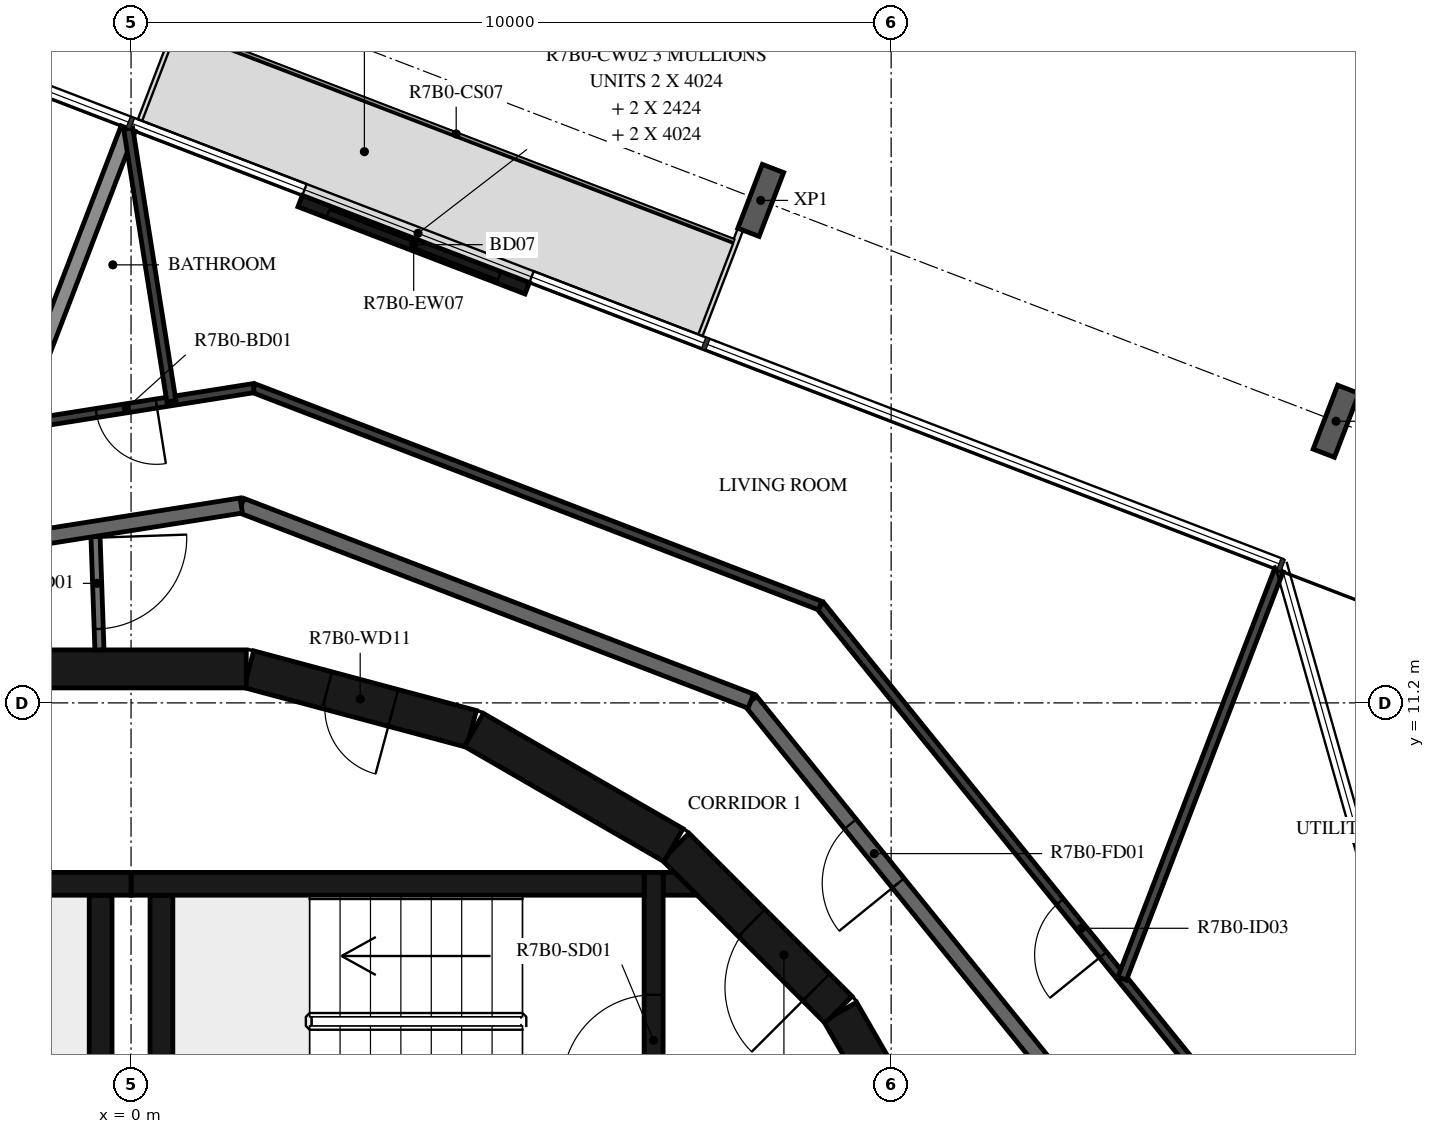
"""IFC4 building model, lengths in metres.
Left out: names, types, materials, properties, quantities, classifications, styles, units other than length and angle.
Written with IfcOpenShell. Run it as: python <this file> out.ifc"""

import sys

from ifc_helpers import new_model, si_unit, direction, frame, frame_2d, origin, origin_2d, place, context, subcontext, project, spatial, polyline, rectangle, i_section, outline, extrude, element, fill, save


model = new_model("IFC4")
c1 = context("Model", 3, precision=1e-05, world=origin(), true_north=direction((0.0, 1.0)))
c2 = subcontext(c1, "Body", "Model", "MODEL_VIEW")
j1 = project(units=[si_unit("LENGTHUNIT", "METRE"), si_unit("PLANEANGLEUNIT", "RADIAN")], contexts=[c1])
p1 = place(None, origin())
s1 = spatial("IfcSite", under=j1, at=p1, CompositionType="ELEMENT")
p2 = place(p1, origin())
s2 = spatial("IfcBuilding", under=s1, at=p2, CompositionType="ELEMENT")
p3 = place(p2, frame((0.0, 0.0, 277.4)))
s3 = spatial("IfcBuildingStorey", under=s2, at=p3, CompositionType="ELEMENT", Elevation=277.4)
for number, where, z_axis, x_axis in (
    (1, (15.854, 14.905, -0.38), (0.0, 0.0, 1.0), (0.934, -0.358, 0.0)),
    (2, (8.284, 17.811, -0.38), (0.0, 0.0, 1.0), (0.934, -0.358, 0.0)),
):
    element("IfcColumn", number, at=place(p3, frame(where, z_axis=z_axis, x_axis=x_axis)), inside=s3, PredefinedType="COLUMN", context=c2, shape_type="SweptSolid", body=[
        extrude(i_section(OverallWidth=0.3, OverallDepth=0.9, WebThickness=0.019, FlangeThickness=0.035, FilletRadius=0.03, at=origin_2d()), origin(), (0.0, 0.0, 1.0), 3.5),
    ])
p4 = place(p3, frame((5.212, 16.655, 0.0), z_axis=(0.0, 0.0, 1.0), x_axis=(-0.933579413923, 0.358370587381, 0.0)))
e3 = element("IfcWall", 3, at=p4, inside=s3, PredefinedType="STANDARD", context=c2, shape_type="SweptSolid", body=[
    extrude(rectangle(XDim=3.2, YDim=0.16, at=frame_2d((1.6, 0.0))), origin(), (0.0, 0.0, 1.0), 3.12),
])
p5 = place(p4, frame((0.4, 0.0, 0.0)))
e4 = element("IfcOpeningElement", 4, at=p5, cuts=e3, PredefinedType="OPENING", context=c2, shape_type="SweptSolid", body=[
    extrude(rectangle(XDim=2.4, YDim=2.4, at=frame_2d((1.2, 1.2))), frame((0.0, 0.09, 0.0), z_axis=(0.0, -1.0, 0.0), x_axis=(1.0, 0.0, 0.0)), (0.0, 0.0, 1.0), 0.18),
])
p6 = place(p3, frame((10.845, 4.51, 0.0), z_axis=(0.0, 0.0, 1.0), x_axis=(-0.500087131594, 0.865975092491, 0.0)))
e5 = element("IfcWall", 5, at=p6, inside=s3, PredefinedType="SHEAR", context=c2, shape_type="SweptSolid", body=[
    extrude(rectangle(XDim=3.033, YDim=0.5, at=frame_2d((1.516, 0.0))), origin(), (0.0, 0.0, 1.0), 3.12),
])
p7 = place(p3, frame((9.308, 7.164, 0.0), z_axis=(0.0, 0.0, 1.0), x_axis=(-0.707106781187, 0.707106781187, 0.0)))
e6 = element("IfcWall", 6, at=p7, inside=s3, PredefinedType="SHEAR", context=c2, shape_type="SweptSolid", body=[
    extrude(rectangle(XDim=3.032, YDim=0.5, at=frame_2d((1.516, 0.0))), origin(), (0.0, 0.0, 1.0), 3.12),
])
p8 = place(p7, frame((0.416, 0.0, 0.0)))
e7 = element("IfcOpeningElement", 7, at=p8, cuts=e6, PredefinedType="OPENING", context=c2, shape_type="SweptSolid", body=[
    extrude(rectangle(XDim=1.2, YDim=2.1, at=frame_2d((0.6, 1.05))), frame((0.0, 0.26, 0.0), z_axis=(0.0, -1.0, 0.0), x_axis=(1.0, 0.0, 0.0)), (0.0, 0.0, 1.0), 0.52),
])
p9 = place(p3, frame((7.137, 9.329, 0.0), z_axis=(0.0, 0.0, 1.0), x_axis=(-0.865975092491, 0.500087131594, 0.0)))
e8 = element("IfcWall", 8, at=p9, inside=s3, PredefinedType="SHEAR", context=c2, shape_type="SweptSolid", body=[
    extrude(rectangle(XDim=3.033, YDim=0.5, at=frame_2d((1.516, 0.0))), origin(), (0.0, 0.0, 1.0), 3.12),
])
p10 = place(p3, frame((4.479, 10.858, 0.0), z_axis=(0.0, 0.0, 1.0), x_axis=(-0.965948410781, 0.258734743916, 0.0)))
e9 = element("IfcWall", 9, at=p10, inside=s3, PredefinedType="SHEAR", context=c2, shape_type="SweptSolid", body=[
    extrude(rectangle(XDim=3.033, YDim=0.5, at=frame_2d((1.516, 0.0))), origin(), (0.0, 0.0, 1.0), 3.12),
])
p11 = place(p10, frame((1.066, 0.0, 0.0)))
e10 = element("IfcOpeningElement", 10, at=p11, cuts=e9, PredefinedType="OPENING", context=c2, shape_type="SweptSolid", body=[
    extrude(rectangle(XDim=0.9, YDim=2.1, at=frame_2d((0.45, 1.05))), frame((0.0, 0.26, 0.0), z_axis=(0.0, -1.0, 0.0), x_axis=(1.0, 0.0, 0.0)), (0.0, 0.0, 1.0), 0.52),
])
p12 = place(p3, frame((1.516, 11.647, 0.0), z_axis=(0.0, 0.0, 1.0), x_axis=(-1.0, 0.0, 0.0)))
e11 = element("IfcWall", 11, at=p12, inside=s3, PredefinedType="SHEAR", context=c2, shape_type="SweptSolid", body=[
    extrude(rectangle(XDim=3.033, YDim=0.5, at=frame_2d((1.516, 0.0))), origin(), (0.0, 0.0, 1.0), 3.12),
])
p13 = place(p3, frame((0.0, 8.82, 0.0), z_axis=(0.0, 0.0, 1.0), x_axis=(1.0, 0.0, 0.0)))
e12 = element("IfcWall", 12, at=p13, inside=s3, PredefinedType="SHEAR", context=c2, shape_type="SweptSolid", body=[
    extrude(rectangle(XDim=6.75, YDim=0.3, at=frame_2d((3.375, 0.0))), origin(), (0.0, 0.0, 1.0), 3.12),
])
p14 = place(p3, frame((0.4, 5.35, 0.0), z_axis=(0.0, 0.0, 1.0), x_axis=(0.0, 1.0, 0.0)))
e13 = element("IfcWall", 13, at=p14, inside=s3, PredefinedType="SHEAR", context=c2, shape_type="SweptSolid", body=[
    extrude(rectangle(XDim=3.32, YDim=0.3, at=frame_2d((1.66, 0.0))), origin(), (0.0, 0.0, 1.0), 3.12),
])
p15 = place(p3, frame((6.875, 5.05, 0.0), z_axis=(0.0, 0.0, 1.0), x_axis=(0.0, 1.0, 0.0)))
e14 = element("IfcWall", 14, at=p15, inside=s3, PredefinedType="SHEAR", context=c2, shape_type="SweptSolid", body=[
    extrude(rectangle(XDim=3.92, YDim=0.25, at=frame_2d((1.96, 0.0))), origin(), (0.0, 0.0, 1.0), 3.12),
])
p16 = place(p15, frame((1.11, 0.0, 0.0)))
e15 = element("IfcOpeningElement", 15, at=p16, cuts=e14, PredefinedType="OPENING", context=c2, shape_type="SweptSolid", body=[
    extrude(rectangle(XDim=1.2, YDim=2.1, at=frame_2d((0.6, 1.05))), frame((0.0, 0.135, 0.0), z_axis=(0.0, -1.0, 0.0), x_axis=(1.0, 0.0, 0.0)), (0.0, 0.0, 1.0), 0.27),
])
p17 = place(p3, origin())
e16 = element("IfcWall", 16, at=p17, inside=s3, PredefinedType="SHEAR", context=c2, shape_type="SweptSolid", body=[
    extrude(outline(polyline([(7.448, 8.67), (7.0, 8.67), (7.0, 8.97), (7.148, 8.97), (7.448, 8.67)])), origin(), (0.0, 0.0, 1.0), 3.12),
])
p18 = place(p3, frame((-6.75, 8.82, 0.0), z_axis=(0.0, 0.0, 1.0), x_axis=(1.0, 0.0, 0.0)))
e17 = element("IfcWall", 17, at=p18, inside=s3, PredefinedType="SHEAR", context=c2, shape_type="SweptSolid", body=[
    extrude(rectangle(XDim=6.75, YDim=0.3, at=frame_2d((3.375, 0.0))), origin(), (0.0, 0.0, 1.0), 3.12),
])
p19 = place(p3, frame((-0.4, 5.35, 0.0), z_axis=(0.0, 0.0, 1.0), x_axis=(0.0, 1.0, 0.0)))
e18 = element("IfcWall", 18, at=p19, inside=s3, PredefinedType="SHEAR", context=c2, shape_type="SweptSolid", body=[
    extrude(rectangle(XDim=3.32, YDim=0.3, at=frame_2d((1.66, 0.0))), origin(), (0.0, 0.0, 1.0), 3.12),
])
p20 = place(p3, frame((-0.471, 13.492, 0.0), z_axis=(0.0, 0.0, 1.0), x_axis=(0.034873173869, -0.999391745886, 0.0)))
e19 = element("IfcWall", 19, at=p20, inside=s3, PredefinedType="PARTITIONING", context=c2, shape_type="SweptSolid", body=[
    extrude(rectangle(XDim=1.596, YDim=0.12, at=frame_2d((0.798, 0.0))), origin(), (0.0, 0.0, 1.0), 3.12),
])
p21 = place(p20, frame((0.12, 0.0, 0.0)))
e20 = element("IfcOpeningElement", 20, at=p21, cuts=e19, PredefinedType="OPENING", context=c2, shape_type="SweptSolid", body=[
    extrude(rectangle(XDim=1.2, YDim=2.1, at=frame_2d((0.6, 1.05))), frame((0.0, 0.07, 0.0), z_axis=(0.0, -1.0, 0.0), x_axis=(1.0, 0.0, 0.0)), (0.0, 0.0, 1.0), 0.14),
])
p22 = place(p3, frame((12.673, 5.643, 0.0), z_axis=(0.0, 0.0, 1.0), x_axis=(-0.629302871585, 0.777160148113, 0.0)))
e21 = element("IfcWall", 21, at=p22, inside=s3, PredefinedType="STANDARD", context=c2, shape_type="SweptSolid", body=[
    extrude(rectangle(XDim=7.181, YDim=0.2, at=frame_2d((3.59, 0.0))), origin(), (0.0, 0.0, 1.0), 3.12),
])
p23 = place(p22, frame((4.1, 0.0, 0.0)))
e22 = element("IfcOpeningElement", 22, at=p23, cuts=e21, PredefinedType="OPENING", context=c2, shape_type="SweptSolid", body=[
    extrude(rectangle(XDim=1.0, YDim=2.1, at=frame_2d((0.5, 1.05))), frame((0.0, 0.11, 0.0), z_axis=(0.0, -1.0, 0.0), x_axis=(1.0, 0.0, 0.0)), (0.0, 0.0, 1.0), 0.22),
])
p24 = place(p3, frame((8.154, 11.223, 0.0), z_axis=(0.0, 0.0, 1.0), x_axis=(-0.93359073609, 0.358341090983, 0.0)))
e23 = element("IfcWall", 23, at=p24, inside=s3, PredefinedType="STANDARD", context=c2, shape_type="SweptSolid", body=[
    extrude(rectangle(XDim=7.181, YDim=0.2, at=frame_2d((3.59, 0.0))), origin(), (0.0, 0.0, 1.0), 3.12),
])
p25 = place(p3, frame((1.45, 13.797, 0.0), z_axis=(0.0, 0.0, 1.0), x_axis=(-0.987690361611, -0.156421704315, 0.0)))
e24 = element("IfcWall", 24, at=p25, inside=s3, PredefinedType="STANDARD", context=c2, shape_type="SweptSolid", body=[
    extrude(rectangle(XDim=7.181, YDim=0.2, at=frame_2d((3.591, 0.0))), origin(), (0.0, 0.0, 1.0), 3.12),
])
p26 = place(p3, frame((-0.037, 18.756, 0.0), z_axis=(0.0, 0.0, 1.0), x_axis=(-0.358365943542, -0.933581196527, 0.0)))
e25 = element("IfcWall", 25, at=p26, inside=s3, PredefinedType="STANDARD", context=c2, shape_type="SweptSolid", body=[
    extrude(rectangle(XDim=5.924, YDim=0.2, at=frame_2d((2.962, 0.0))), origin(), (0.0, 0.0, 1.0), 2.73),
])
p27 = place(p3, frame((14.092, 6.274, 0.0), z_axis=(0.0, 0.0, 1.0), x_axis=(-0.62933367237, 0.777135206268, 0.0)))
e26 = element("IfcWall", 26, at=p27, inside=s3, PredefinedType="PARTITIONING", context=c2, shape_type="SweptSolid", body=[
    extrude(rectangle(XDim=7.985, YDim=0.12, at=frame_2d((3.992, 0.0))), origin(), (0.0, 0.0, 1.0), 3.12),
])
p28 = place(p27, frame((2.073, 0.0, 0.0)))
e27 = element("IfcOpeningElement", 27, at=p28, cuts=e26, PredefinedType="OPENING", context=c2, shape_type="SweptSolid", body=[
    extrude(rectangle(XDim=0.9, YDim=2.1, at=frame_2d((0.45, 1.05))), frame((0.0, 0.07, 0.0), z_axis=(0.0, -1.0, 0.0), x_axis=(1.0, 0.0, 0.0)), (0.0, 0.0, 1.0), 0.14),
])
p29 = place(p3, frame((9.067, 12.479, 0.0), z_axis=(0.0, 0.0, 1.0), x_axis=(-0.933579449035, 0.358370495911, 0.0)))
e28 = element("IfcWall", 28, at=p29, inside=s3, PredefinedType="PARTITIONING", context=c2, shape_type="SweptSolid", body=[
    extrude(rectangle(XDim=7.985, YDim=0.12, at=frame_2d((3.992, 0.0))), origin(), (0.0, 0.0, 1.0), 3.12),
])
p30 = place(p3, frame((1.612, 15.341, 0.0), z_axis=(0.0, 0.0, 1.0), x_axis=(-0.987687176419, -0.156441815179, 0.0)))
e29 = element("IfcWall", 29, at=p30, inside=s3, PredefinedType="PARTITIONING", context=c2, shape_type="SweptSolid", body=[
    extrude(rectangle(XDim=3.191, YDim=0.12, at=frame_2d((1.596, 0.0))), origin(), (0.0, 0.0, 1.0), 3.12),
])
p31 = place(p30, frame((1.295, 0.0, 0.0)))
e30 = element("IfcOpeningElement", 30, at=p31, cuts=e29, PredefinedType="OPENING", context=c2, shape_type="SweptSolid", body=[
    extrude(rectangle(XDim=0.8, YDim=2.1, at=frame_2d((0.4, 1.05))), frame((0.0, 0.07, 0.0), z_axis=(0.0, -1.0, 0.0), x_axis=(1.0, 0.0, 0.0)), (0.0, 0.0, 1.0), 0.14),
])
p32 = place(p3, frame((15.101, 12.945, 0.0), z_axis=(0.0, 0.0, 1.0), x_axis=(-0.358373232579, -0.933578398513, 0.0)))
e31 = element("IfcWall", 31, at=p32, inside=s3, PredefinedType="PARTITIONING", context=c2, shape_type="SweptSolid", body=[
    extrude(rectangle(XDim=5.752, YDim=0.12, at=frame_2d((2.876, 0.0))), origin(), (0.0, 0.0, 1.0), 2.73),
])
p33 = place(p3, frame((-0.037, 18.756, 0.0), z_axis=(0.0, 0.0, 1.0), x_axis=(0.156421851095, -0.987690338365, 0.0)))
e32 = element("IfcWall", 32, at=p33, inside=s3, PredefinedType="PARTITIONING", context=c2, shape_type="SweptSolid", body=[
    extrude(rectangle(XDim=3.63, YDim=0.12, at=frame_2d((1.815, 0.0))), origin(), (0.0, 0.0, 1.0), 3.12),
])
p34 = place(p5, origin())
e33 = element("IfcDoor", 33, at=p34, inside=s3, OperationType="DOUBLE_DOOR_SLIDING", PredefinedType="DOOR", context=c2, shape_type="SweptSolid", body=[
    extrude(rectangle(XDim=2.4, YDim=2.4, at=frame_2d((1.2, 1.2))), frame((0.0, 0.025, 0.0), z_axis=(0.0, -1.0, 0.0), x_axis=(1.0, 0.0, 0.0)), (0.0, 0.0, 1.0), 0.05),
])
fill(e4, e33)
p35 = place(p16, origin())
e34 = element("IfcDoor", 34, at=p35, inside=s3, OperationType="SINGLE_SWING_LEFT", PredefinedType="DOOR", context=c2, shape_type="SweptSolid", body=[
    extrude(rectangle(XDim=1.2, YDim=2.1, at=frame_2d((0.6, 1.05))), frame((0.0, 0.025, 0.0), z_axis=(0.0, -1.0, 0.0), x_axis=(1.0, 0.0, 0.0)), (0.0, 0.0, 1.0), 0.05),
])
fill(e15, e34)
p36 = place(p8, origin())
e35 = element("IfcDoor", 35, at=p36, inside=s3, OperationType="SINGLE_SWING_RIGHT", PredefinedType="DOOR", context=c2, shape_type="SweptSolid", body=[
    extrude(rectangle(XDim=1.2, YDim=2.1, at=frame_2d((0.6, 1.05))), frame((0.0, 0.025, 0.0), z_axis=(0.0, -1.0, 0.0), x_axis=(1.0, 0.0, 0.0)), (0.0, 0.0, 1.0), 0.05),
])
fill(e7, e35)
p37 = place(p11, origin())
e36 = element("IfcDoor", 36, at=p37, inside=s3, OperationType="SINGLE_SWING_LEFT", PredefinedType="DOOR", context=c2, shape_type="SweptSolid", body=[
    extrude(rectangle(XDim=0.9, YDim=2.1, at=frame_2d((0.45, 1.05))), frame((0.0, 0.025, 0.0), z_axis=(0.0, -1.0, 0.0), x_axis=(1.0, 0.0, 0.0)), (0.0, 0.0, 1.0), 0.05),
])
fill(e10, e36)
p38 = place(p23, origin())
e37 = element("IfcDoor", 37, at=p38, inside=s3, OperationType="SINGLE_SWING_LEFT", PredefinedType="DOOR", context=c2, shape_type="SweptSolid", body=[
    extrude(rectangle(XDim=1.0, YDim=2.1, at=frame_2d((0.5, 1.05))), frame((0.0, 0.025, 0.0), z_axis=(0.0, -1.0, 0.0), x_axis=(1.0, 0.0, 0.0)), (0.0, 0.0, 1.0), 0.05),
])
fill(e22, e37)
p39 = place(p28, origin())
e38 = element("IfcDoor", 38, at=p39, inside=s3, OperationType="SINGLE_SWING_LEFT", PredefinedType="DOOR", context=c2, shape_type="SweptSolid", body=[
    extrude(rectangle(XDim=0.9, YDim=2.1, at=frame_2d((0.45, 1.05))), frame((0.0, 0.025, 0.0), z_axis=(0.0, -1.0, 0.0), x_axis=(1.0, 0.0, 0.0)), (0.0, 0.0, 1.0), 0.05),
])
fill(e27, e38)
p40 = place(p31, origin())
e39 = element("IfcDoor", 39, at=p40, inside=s3, OperationType="SINGLE_SWING_RIGHT", PredefinedType="DOOR", context=c2, shape_type="SweptSolid", body=[
    extrude(rectangle(XDim=0.8, YDim=2.1, at=frame_2d((0.4, 1.05))), frame((0.0, 0.025, 0.0), z_axis=(0.0, -1.0, 0.0), x_axis=(1.0, 0.0, 0.0)), (0.0, 0.0, 1.0), 0.05),
])
fill(e30, e39)
p41 = place(p21, origin())
e40 = element("IfcDoor", 40, at=p41, inside=s3, OperationType="DOUBLE_DOOR_SINGLE_SWING", PredefinedType="DOOR", context=c2, shape_type="SweptSolid", body=[
    extrude(rectangle(XDim=1.2, YDim=2.1, at=frame_2d((0.6, 1.05))), frame((0.0, 0.025, 0.0), z_axis=(0.0, -1.0, 0.0), x_axis=(1.0, 0.0, 0.0)), (0.0, 0.0, 1.0), 0.05),
])
fill(e20, e40)
save(model, sys.argv[1])
